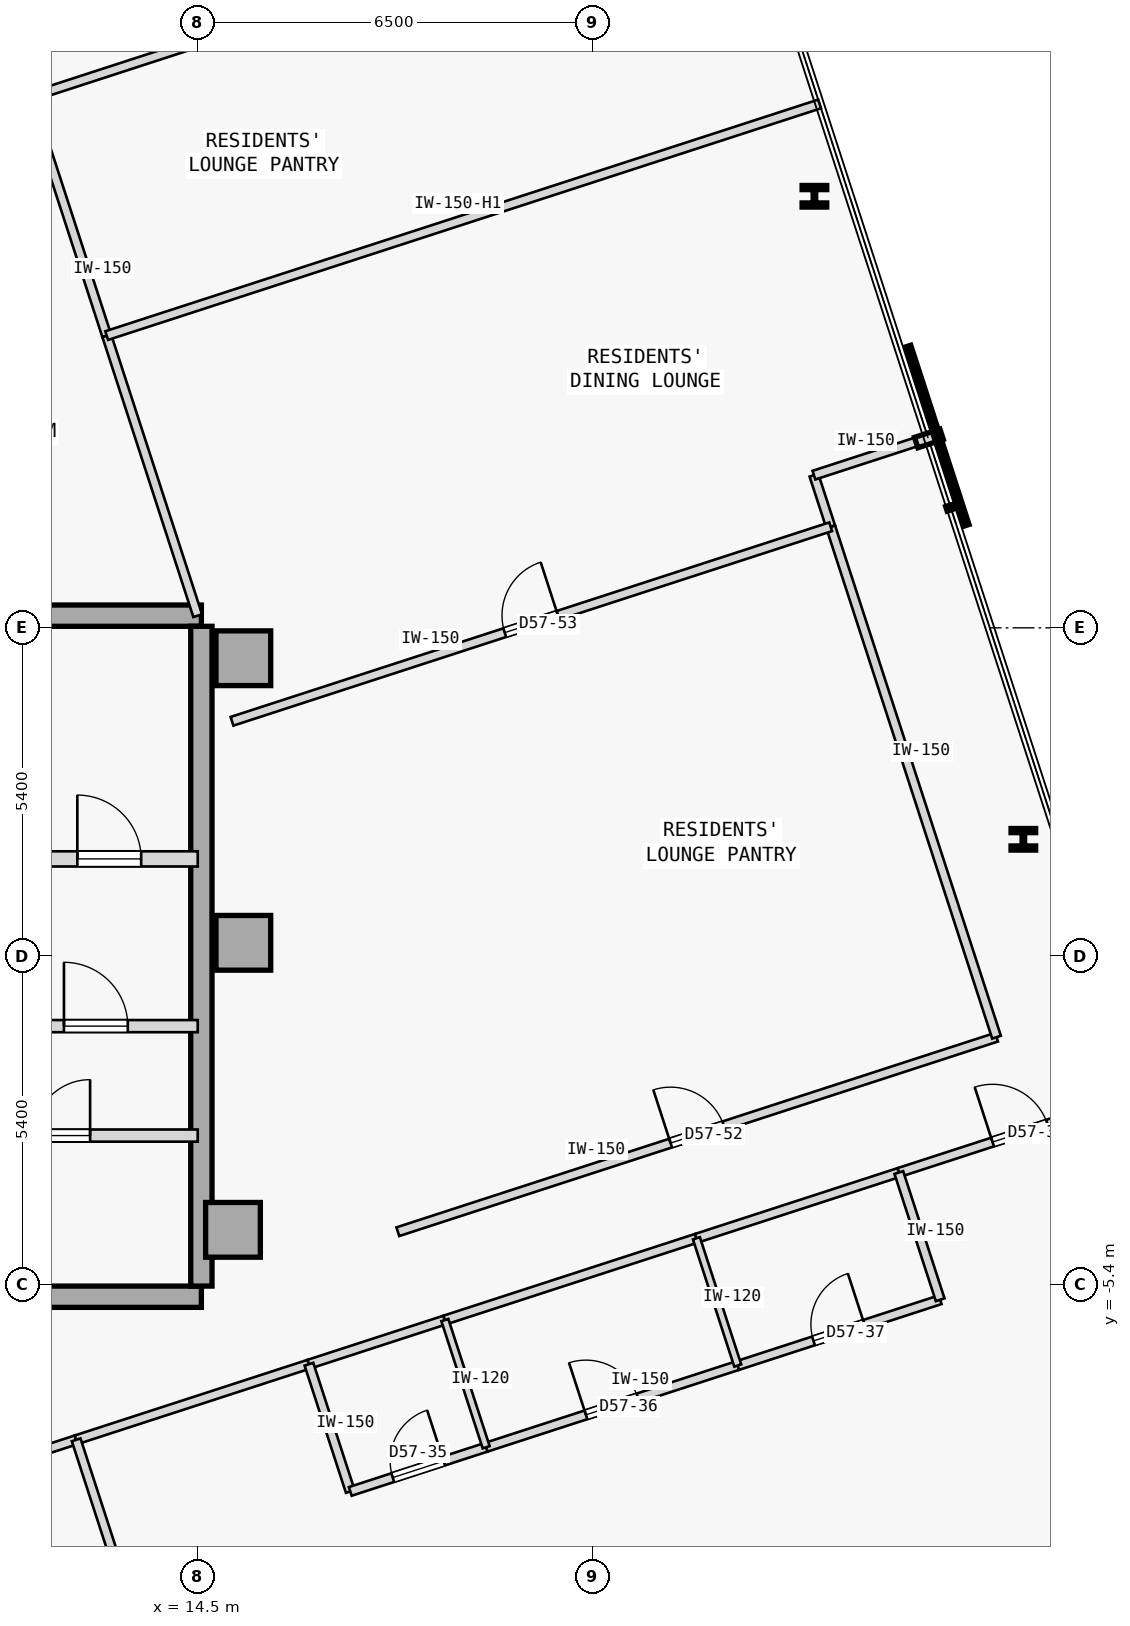
"""IFC4 building model, lengths in metres.
Left out: names, types, materials, properties, quantities, classifications, styles, units other than length and angle.
Written with IfcOpenShell. Run it as: python <this file> out.ifc"""

import sys

from ifc_helpers import new_model, si_unit, direction, frame, frame_2d, origin, origin_2d, place, context, subcontext, project, spatial, rectangle, i_section, extrude, element, fill, save


model = new_model("IFC4")
c1 = context("Model", 3, precision=1e-05, world=origin(), true_north=direction((0.0, 1.0)))
c2 = subcontext(c1, "Body", "Model", "MODEL_VIEW")
j1 = project(units=[si_unit("LENGTHUNIT", "METRE"), si_unit("PLANEANGLEUNIT", "RADIAN")], contexts=[c1])
p1 = place(None, origin())
s1 = spatial("IfcSite", under=j1, at=p1, CompositionType="ELEMENT")
p2 = place(p1, origin())
s2 = spatial("IfcBuilding", under=s1, at=p2, CompositionType="ELEMENT")
p3 = place(p2, frame((0.0, 0.0, 217.6)))
s3 = spatial("IfcBuildingStorey", under=s2, at=p3, CompositionType="ELEMENT", Elevation=217.6)
for number, where, z_axis, x_axis in (
    (1, (15.25, 4.9, 0.0), (0.0, 0.0, 1.0), (1.0, 0.0, 0.0)),
    (2, (15.25, 0.22, 0.0), (0.0, 0.0, 1.0), (1.0, 0.0, 0.0)),
    (3, (15.08, -4.5, 0.0), (0.0, 0.0, 1.0), (1.0, 0.0, 0.0)),
):
    element("IfcColumn", number, at=place(p3, frame(where, z_axis=z_axis, x_axis=x_axis)), inside=s3, PredefinedType="COLUMN", context=c2, shape_type="SweptSolid", body=[
        extrude(rectangle(XDim=0.9, YDim=0.9, at=origin_2d()), origin(), (0.0, 0.0, 1.0), 3.35),
    ])
p4 = place(p3, frame((3.15, 5.6, 0.0), z_axis=(0.0, 0.0, 1.0), x_axis=(1.0, 0.0, 0.0)))
e4 = element("IfcWall", 4, at=p4, inside=s3, PredefinedType="SHEAR", context=c2, shape_type="SweptSolid", body=[
    extrude(rectangle(XDim=11.41, YDim=0.35, at=frame_2d((5.705, 0.0))), origin(), (0.0, 0.0, 1.0), 3.125),
])
p5 = place(p3, frame((3.7, -5.6, 0.0), z_axis=(0.0, 0.0, 1.0), x_axis=(1.0, 0.0, 0.0)))
e5 = element("IfcWall", 5, at=p5, inside=s3, PredefinedType="SHEAR", context=c2, shape_type="SweptSolid", body=[
    extrude(rectangle(XDim=10.86, YDim=0.35, at=frame_2d((5.43, 0.0))), origin(), (0.0, 0.0, 1.0), 3.125),
])
p6 = place(p3, frame((14.56, -5.425, 0.0), z_axis=(0.0, 0.0, 1.0), x_axis=(0.0, 1.0, 0.0)))
e6 = element("IfcWall", 6, at=p6, inside=s3, PredefinedType="SHEAR", context=c2, shape_type="SweptSolid", body=[
    extrude(rectangle(XDim=10.85, YDim=0.35, at=frame_2d((5.425, 0.0))), origin(), (0.0, 0.0, 1.0), 3.125),
])
for number, where, z_axis, x_axis in (
    (7, (28.078, 1.922, 0.0), (0.0, 0.0, 1.0), (1.0, 0.0, 0.0)),
    (8, (24.642, 12.497, 0.0), (0.0, 0.0, 1.0), (1.0, 0.0, 0.0)),
):
    element("IfcColumn", number, at=place(p3, frame(where, z_axis=z_axis, x_axis=x_axis)), inside=s3, PredefinedType="COLUMN", context=c2, shape_type="SweptSolid", body=[
        extrude(i_section(OverallWidth=0.405, OverallDepth=0.355, WebThickness=0.042, FlangeThickness=0.068, FilletRadius=0.015, at=origin_2d()), origin(), (0.0, 0.0, 1.0), 3.35),
    ])
p7 = place(p3, frame((10.9, 1.6, 0.0), z_axis=(0.0, 0.0, 1.0), x_axis=(1.0, 0.0, 0.0)))
e9 = element("IfcWall", 9, at=p7, inside=s3, PredefinedType="STANDARD", context=c2, shape_type="SweptSolid", body=[
    extrude(rectangle(XDim=3.6, YDim=0.25, at=frame_2d((1.8, 0.0))), origin(), (0.0, 0.0, 1.0), 3.125),
])
p8 = place(p7, frame((1.62, 0.0, 0.0)))
e10 = element("IfcOpeningElement", 10, at=p8, cuts=e9, PredefinedType="OPENING", context=c2, shape_type="SweptSolid", body=[
    extrude(rectangle(XDim=1.05, YDim=2.15, at=frame_2d((0.525, 1.075))), frame((0.0, 0.135, 0.0), z_axis=(0.0, -1.0, 0.0), x_axis=(1.0, 0.0, 0.0)), (0.0, 0.0, 1.0), 0.27),
])
p9 = place(p3, frame((11.55, -1.15, 0.0), z_axis=(0.0, 0.0, 1.0), x_axis=(1.0, 0.0, 0.0)))
e11 = element("IfcWall", 11, at=p9, inside=s3, PredefinedType="STANDARD", context=c2, shape_type="SweptSolid", body=[
    extrude(rectangle(XDim=2.95, YDim=0.2, at=frame_2d((1.475, 0.0))), origin(), (0.0, 0.0, 1.0), 3.125),
])
p10 = place(p9, frame((0.75, 0.0, 0.0)))
e12 = element("IfcOpeningElement", 12, at=p10, cuts=e11, PredefinedType="OPENING", context=c2, shape_type="SweptSolid", body=[
    extrude(rectangle(XDim=1.05, YDim=2.18, at=frame_2d((0.525, 1.09))), frame((0.0, 0.11, 0.0), z_axis=(0.0, -1.0, 0.0), x_axis=(1.0, 0.0, 0.0)), (0.0, 0.0, 1.0), 0.22),
])
p11 = place(p3, frame((3.7, -2.95, 0.0), z_axis=(0.0, 0.0, 1.0), x_axis=(1.0, 0.0, 0.0)))
e13 = element("IfcWall", 13, at=p11, inside=s3, PredefinedType="STANDARD", context=c2, shape_type="SweptSolid", body=[
    extrude(rectangle(XDim=10.8, YDim=0.2, at=frame_2d((5.4, 0.0))), origin(), (0.0, 0.0, 1.0), 3.125),
])
p12 = place(p11, frame((0.53, 0.0, 0.0)))
e14 = element("IfcOpeningElement", 14, at=p12, cuts=e13, PredefinedType="OPENING", context=c2, shape_type="SweptSolid", body=[
    extrude(rectangle(XDim=1.1, YDim=2.15, at=frame_2d((0.55, 1.075))), frame((0.0, 0.11, 0.0), z_axis=(0.0, -1.0, 0.0), x_axis=(1.0, 0.0, 0.0)), (0.0, 0.0, 1.0), 0.22),
])
p13 = place(p11, frame((3.79, 0.0, 0.0)))
e15 = element("IfcOpeningElement", 15, at=p13, cuts=e13, PredefinedType="OPENING", context=c2, shape_type="SweptSolid", body=[
    extrude(rectangle(XDim=0.92, YDim=2.15, at=frame_2d((0.46, 1.075))), frame((0.0, 0.11, 0.0), z_axis=(0.0, -1.0, 0.0), x_axis=(1.0, 0.0, 0.0)), (0.0, 0.0, 1.0), 0.22),
])
p14 = place(p11, frame((8.11, 0.0, 0.0)))
e16 = element("IfcOpeningElement", 16, at=p14, cuts=e13, PredefinedType="OPENING", context=c2, shape_type="SweptSolid", body=[
    extrude(rectangle(XDim=0.92, YDim=2.15, at=frame_2d((0.46, 1.075))), frame((0.0, 0.11, 0.0), z_axis=(0.0, -1.0, 0.0), x_axis=(1.0, 0.0, 0.0)), (0.0, 0.0, 1.0), 0.22),
])
p15 = place(p3, frame((6.926, -9.765, 0.0), z_axis=(0.0, 0.0, 1.0), x_axis=(0.951054878391, 0.30902203528, 0.0)))
e17 = element("IfcWall", 17, at=p15, inside=s3, PredefinedType="PARTITIONING", context=c2, shape_type="SweptSolid", body=[
    extrude(rectangle(XDim=5.862, YDim=0.15, at=frame_2d((2.931, 0.0))), origin(), (0.0, 0.0, 1.0), 3.125),
])
p16 = place(p15, frame((2.456, 0.0, 0.0)))
e18 = element("IfcOpeningElement", 18, at=p16, cuts=e17, PredefinedType="OPENING", context=c2, shape_type="SweptSolid", body=[
    extrude(rectangle(XDim=0.95, YDim=2.15, at=frame_2d((0.475, 1.075))), frame((0.0, 0.085, 0.0), z_axis=(0.0, -1.0, 0.0), x_axis=(1.0, 0.0, 0.0)), (0.0, 0.0, 1.0), 0.17),
])
p17 = place(p3, frame((12.501, -7.953, 0.0), z_axis=(0.0, 0.0, 1.0), x_axis=(0.951046103464, 0.309049039936, 0.0)))
e19 = element("IfcWall", 19, at=p17, inside=s3, PredefinedType="PARTITIONING", context=c2, shape_type="SweptSolid", body=[
    extrude(rectangle(XDim=4.025, YDim=0.15, at=frame_2d((2.012, 0.0))), origin(), (0.0, 0.0, 1.0), 3.125),
])
p18 = place(p3, frame((26.03, -3.557, 0.0), z_axis=(0.0, 0.0, 1.0), x_axis=(0.951050334989, 0.309036017832, 0.0)))
e20 = element("IfcWall", 20, at=p18, inside=s3, PredefinedType="PARTITIONING", context=c2, shape_type="SweptSolid", body=[
    extrude(rectangle(XDim=4.191, YDim=0.15, at=frame_2d((2.095, 0.0))), origin(), (0.0, 0.0, 1.0), 3.125),
])
p19 = place(p18, frame((1.621, 0.0, 0.0)))
e21 = element("IfcOpeningElement", 21, at=p19, cuts=e20, PredefinedType="OPENING", context=c2, shape_type="SweptSolid", body=[
    extrude(rectangle(XDim=0.95, YDim=2.15, at=frame_2d((0.475, 1.075))), frame((0.0, 0.085, 0.0), z_axis=(0.0, -1.0, 0.0), x_axis=(1.0, 0.0, 0.0)), (0.0, 0.0, 1.0), 0.17),
])
p20 = place(p3, frame((16.329, -6.709, 0.0), z_axis=(0.0, 0.0, 1.0), x_axis=(0.951076048914, 0.308956872689, 0.0)))
e22 = element("IfcWall", 22, at=p20, inside=s3, PredefinedType="PARTITIONING", context=c2, shape_type="SweptSolid", body=[
    extrude(rectangle(XDim=2.35, YDim=0.15, at=frame_2d((1.175, 0.0))), origin(), (0.0, 0.0, 1.0), 3.125),
])
p21 = place(p3, frame((18.564, -5.983, 0.0), z_axis=(0.0, 0.0, 1.0), x_axis=(0.951052627573, 0.309028962374, 0.0)))
e23 = element("IfcWall", 23, at=p21, inside=s3, PredefinedType="PARTITIONING", context=c2, shape_type="SweptSolid", body=[
    extrude(rectangle(XDim=4.35, YDim=0.15, at=frame_2d((2.175, 0.0))), origin(), (0.0, 0.0, 1.0), 3.125),
])
p22 = place(p3, frame((22.701, -4.639, 0.0), z_axis=(0.0, 0.0, 1.0), x_axis=(0.951062257173, 0.308999325213, 0.0)))
e24 = element("IfcWall", 24, at=p22, inside=s3, PredefinedType="PARTITIONING", context=c2, shape_type="SweptSolid", body=[
    extrude(rectangle(XDim=3.5, YDim=0.15, at=frame_2d((1.75, 0.0))), origin(), (0.0, 0.0, 1.0), 3.125),
])
p23 = place(p3, frame((17.791, -4.531, 0.0), z_axis=(0.0, 0.0, 1.0), x_axis=(0.951056769902, 0.309016213852, 0.0)))
e25 = element("IfcWall", 25, at=p23, inside=s3, PredefinedType="PARTITIONING", context=c2, shape_type="SweptSolid", body=[
    extrude(rectangle(XDim=10.352, YDim=0.15, at=frame_2d((5.176, 0.0))), origin(), (0.0, 0.0, 1.0), 3.125),
])
p24 = place(p23, frame((4.716, 0.0, 0.0)))
e26 = element("IfcOpeningElement", 26, at=p24, cuts=e25, PredefinedType="OPENING", context=c2, shape_type="SweptSolid", body=[
    extrude(rectangle(XDim=0.92, YDim=2.15, at=frame_2d((0.46, 1.075))), frame((0.0, 0.085, 0.0), z_axis=(0.0, -1.0, 0.0), x_axis=(1.0, 0.0, 0.0)), (0.0, 0.0, 1.0), 0.17),
])
p25 = place(p3, frame((27.637, -1.332, 0.0), z_axis=(0.0, 0.0, 1.0), x_axis=(-0.309040411618, 0.951048907253, 0.0)))
e27 = element("IfcWall", 27, at=p25, inside=s3, PredefinedType="PARTITIONING", context=c2, shape_type="SweptSolid", body=[
    extrude(rectangle(XDim=8.826, YDim=0.15, at=frame_2d((4.413, 0.0))), origin(), (0.0, 0.0, 1.0), 3.125),
])
p26 = place(p3, frame((24.909, 7.062, 0.0), z_axis=(0.0, 0.0, 1.0), x_axis=(-0.30899324298, 0.951064233263, 0.0)))
e28 = element("IfcWall", 28, at=p26, inside=s3, PredefinedType="PARTITIONING", context=c2, shape_type="SweptSolid", body=[
    extrude(rectangle(XDim=0.892, YDim=0.15, at=frame_2d((0.446, 0.0))), origin(), (0.0, 0.0, 1.0), 3.125),
])
p27 = place(p3, frame((24.634, 7.91, 0.0), z_axis=(0.0, 0.0, 1.0), x_axis=(0.951054051148, 0.309024581215, 0.0)))
e29 = element("IfcWall", 29, at=p27, inside=s3, PredefinedType="PARTITIONING", context=c2, shape_type="SweptSolid", body=[
    extrude(rectangle(XDim=1.975, YDim=0.15, at=frame_2d((0.988, 0.0))), origin(), (0.0, 0.0, 1.0), 3.125),
])
p28 = place(p3, frame((11.73, 14.123, 0.0), z_axis=(0.0, 0.0, 1.0), x_axis=(0.951060263663, 0.309005460926, 0.0)))
e30 = element("IfcWall", 30, at=p28, inside=s3, PredefinedType="PARTITIONING", context=c2, shape_type="SweptSolid", body=[
    extrude(rectangle(XDim=12.327, YDim=0.15, at=frame_2d((6.164, 0.0))), origin(), (0.0, 0.0, 1.0), 3.125),
])
p29 = place(p28, frame((5.704, 0.0, 0.0)))
e31 = element("IfcOpeningElement", 31, at=p29, cuts=e30, PredefinedType="OPENING", context=c2, shape_type="SweptSolid", body=[
    extrude(rectangle(XDim=0.92, YDim=2.15, at=frame_2d((0.46, 1.075))), frame((0.0, 0.085, 0.0), z_axis=(0.0, -1.0, 0.0), x_axis=(1.0, 0.0, 0.0)), (0.0, 0.0, 1.0), 0.17),
])
p30 = place(p3, frame((15.548, -17.333, 0.0), z_axis=(0.0, 0.0, 1.0), x_axis=(-0.308999867152, 0.951062081097, 0.0)))
e32 = element("IfcWall", 32, at=p30, inside=s3, PredefinedType="PARTITIONING", context=c2, shape_type="SweptSolid", body=[
    extrude(rectangle(XDim=9.862, YDim=0.15, at=frame_2d((4.931, 0.0))), origin(), (0.0, 0.0, 1.0), 3.125),
])
p31 = place(p3, frame((17.009, -8.802, 0.0), z_axis=(0.0, 0.0, 1.0), x_axis=(-0.309028364152, 0.951052821956, 0.0)))
e33 = element("IfcWall", 33, at=p31, inside=s3, PredefinedType="PARTITIONING", context=c2, shape_type="SweptSolid", body=[
    extrude(rectangle(XDim=2.2, YDim=0.15, at=frame_2d((1.1, 0.0))), origin(), (0.0, 0.0, 1.0), 3.125),
])
p32 = place(p3, frame((17.009, -8.802, 0.0), z_axis=(0.0, 0.0, 1.0), x_axis=(0.951035595692, 0.309081373955, 0.0)))
e34 = element("IfcWall", 34, at=p32, inside=s3, PredefinedType="PARTITIONING", context=c2, shape_type="SweptSolid", body=[
    extrude(rectangle(XDim=2.35, YDim=0.15, at=frame_2d((1.175, 0.0))), origin(), (0.0, 0.0, 1.0), 3.125),
])
p33 = place(p32, frame((0.735, 0.0, 0.0)))
e35 = element("IfcOpeningElement", 35, at=p33, cuts=e34, PredefinedType="OPENING", context=c2, shape_type="SweptSolid", body=[
    extrude(rectangle(XDim=0.88, YDim=2.15, at=frame_2d((0.44, 1.075))), frame((0.0, 0.085, 0.0), z_axis=(0.0, -1.0, 0.0), x_axis=(1.0, 0.0, 0.0)), (0.0, 0.0, 1.0), 0.17),
])
p34 = place(p3, frame((19.244, -8.075, 0.0), z_axis=(0.0, 0.0, 1.0), x_axis=(0.951057987102, 0.309012467661, 0.0)))
e36 = element("IfcWall", 36, at=p34, inside=s3, PredefinedType="PARTITIONING", context=c2, shape_type="SweptSolid", body=[
    extrude(rectangle(XDim=4.35, YDim=0.15, at=frame_2d((2.175, 0.0))), origin(), (0.0, 0.0, 1.0), 3.125),
])
p35 = place(p34, frame((1.725, 0.0, 0.0)))
e37 = element("IfcOpeningElement", 37, at=p35, cuts=e36, PredefinedType="OPENING", context=c2, shape_type="SweptSolid", body=[
    extrude(rectangle(XDim=0.9, YDim=2.15, at=frame_2d((0.45, 1.075))), frame((0.0, 0.085, 0.0), z_axis=(0.0, -1.0, 0.0), x_axis=(1.0, 0.0, 0.0)), (0.0, 0.0, 1.0), 0.17),
])
p36 = place(p3, frame((23.381, -6.731, 0.0), z_axis=(0.0, 0.0, 1.0), x_axis=(0.951055596592, 0.309019824916, 0.0)))
e38 = element("IfcWall", 38, at=p36, inside=s3, PredefinedType="PARTITIONING", context=c2, shape_type="SweptSolid", body=[
    extrude(rectangle(XDim=3.5, YDim=0.15, at=frame_2d((1.75, 0.0))), origin(), (0.0, 0.0, 1.0), 3.125),
])
p37 = place(p36, frame((1.31, 0.0, 0.0)))
e39 = element("IfcOpeningElement", 39, at=p37, cuts=e38, PredefinedType="OPENING", context=c2, shape_type="SweptSolid", body=[
    extrude(rectangle(XDim=0.88, YDim=2.15, at=frame_2d((0.44, 1.075))), frame((0.0, 0.085, 0.0), z_axis=(0.0, -1.0, 0.0), x_axis=(1.0, 0.0, 0.0)), (0.0, 0.0, 1.0), 0.17),
])
p38 = place(p3, frame((26.709, -5.65, 0.0), z_axis=(0.0, 0.0, 1.0), x_axis=(-0.308960600764, 0.951074837842, 0.0)))
e40 = element("IfcWall", 40, at=p38, inside=s3, PredefinedType="PARTITIONING", context=c2, shape_type="SweptSolid", body=[
    extrude(rectangle(XDim=2.2, YDim=0.15, at=frame_2d((1.1, 0.0))), origin(), (0.0, 0.0, 1.0), 3.125),
])
for number, where, z_axis, x_axis in (
    (41, (19.244, -8.075, 0.0), (0.0, 0.0, 1.0), (-0.309, 0.951, 0.0)),
    (42, (23.381, -6.731, 0.0), (0.0, 0.0, 1.0), (-0.309, 0.951, 0.0)),
):
    element("IfcWall", number, at=place(p3, frame(where, z_axis=z_axis, x_axis=x_axis)), inside=s3, PredefinedType="PARTITIONING", context=c2, shape_type="SweptSolid", body=[
        extrude(rectangle(XDim=2.2, YDim=0.12, at=frame_2d((1.1, 0.0))), origin(), (0.0, 0.0, 1.0), 3.125),
    ])
p39 = place(p3, frame((14.5, 5.6, 0.0), z_axis=(0.0, 0.0, 1.0), x_axis=(-0.308974360462, 0.951070367837, 0.0)))
e43 = element("IfcWall", 43, at=p39, inside=s3, PredefinedType="PARTITIONING", context=c2, shape_type="SweptSolid", body=[
    extrude(rectangle(XDim=4.843, YDim=0.15, at=frame_2d((2.421, 0.0))), origin(), (0.0, 0.0, 1.0), 3.125),
])
p40 = place(p3, frame((13.003, 10.206, 0.0), z_axis=(0.0, 0.0, 1.0), x_axis=(-0.309035144366, 0.951050618814, 0.0)))
e44 = element("IfcWall", 44, at=p40, inside=s3, PredefinedType="PARTITIONING", context=c2, shape_type="SweptSolid", body=[
    extrude(rectangle(XDim=4.119, YDim=0.15, at=frame_2d((2.06, 0.0))), origin(), (0.0, 0.0, 1.0), 3.125),
])
p41 = place(p3, frame((15.064, 3.863, 0.0), z_axis=(0.0, 0.0, 1.0), x_axis=(0.951061448945, 0.309001812827, 0.0)))
e45 = element("IfcWall", 45, at=p41, inside=s3, PredefinedType="PARTITIONING", context=c2, shape_type="SweptSolid", body=[
    extrude(rectangle(XDim=10.352, YDim=0.15, at=frame_2d((5.176, 0.0))), origin(), (0.0, 0.0, 1.0), 3.125),
])
p42 = place(p41, frame((4.716, 0.0, 0.0)))
e46 = element("IfcOpeningElement", 46, at=p42, cuts=e45, PredefinedType="OPENING", context=c2, shape_type="SweptSolid", body=[
    extrude(rectangle(XDim=0.92, YDim=2.15, at=frame_2d((0.46, 1.075))), frame((0.0, 0.085, 0.0), z_axis=(0.0, -1.0, 0.0), x_axis=(1.0, 0.0, 0.0)), (0.0, 0.0, 1.0), 0.17),
])
p43 = place(p3, frame((13.003, 10.206, 0.0), z_axis=(0.0, 0.0, 1.0), x_axis=(0.951060263663, 0.309005460926, 0.0)))
e47 = element("IfcWall", 47, at=p43, inside=s3, PredefinedType="PARTITIONING", context=c2, shape_type="SweptSolid", body=[
    extrude(rectangle(XDim=12.327, YDim=0.15, at=frame_2d((6.164, 0.0))), origin(), (0.0, 0.0, 1.0), 2.675),
])
p44 = place(p8, origin())
e48 = element("IfcDoor", 48, at=p44, inside=s3, OperationType="SINGLE_SWING_LEFT", PredefinedType="DOOR", context=c2, shape_type="SweptSolid", body=[
    extrude(rectangle(XDim=1.05, YDim=2.15, at=frame_2d((0.525, 1.075))), frame((0.0, 0.025, 0.0), z_axis=(0.0, -1.0, 0.0), x_axis=(1.0, 0.0, 0.0)), (0.0, 0.0, 1.0), 0.05),
])
fill(e10, e48)
p45 = place(p10, origin())
e49 = element("IfcDoor", 49, at=p45, inside=s3, OperationType="SINGLE_SWING_LEFT", PredefinedType="DOOR", context=c2, shape_type="SweptSolid", body=[
    extrude(rectangle(XDim=1.05, YDim=2.18, at=frame_2d((0.525, 1.09))), frame((0.0, 0.025, 0.0), z_axis=(0.0, -1.0, 0.0), x_axis=(1.0, 0.0, 0.0)), (0.0, 0.0, 1.0), 0.05),
])
fill(e12, e49)
p46 = place(p14, origin())
e50 = element("IfcDoor", 50, at=p46, inside=s3, OperationType="SINGLE_SWING_RIGHT", PredefinedType="DOOR", context=c2, shape_type="SweptSolid", body=[
    extrude(rectangle(XDim=0.92, YDim=2.15, at=frame_2d((0.46, 1.075))), frame((0.0, 0.025, 0.0), z_axis=(0.0, -1.0, 0.0), x_axis=(1.0, 0.0, 0.0)), (0.0, 0.0, 1.0), 0.05),
])
fill(e16, e50)
p47 = place(p19, origin())
e51 = element("IfcDoor", 51, at=p47, inside=s3, OperationType="SINGLE_SWING_LEFT", PredefinedType="DOOR", context=c2, shape_type="SweptSolid", body=[
    extrude(rectangle(XDim=0.95, YDim=2.15, at=frame_2d((0.475, 1.075))), frame((0.0, 0.025, 0.0), z_axis=(0.0, -1.0, 0.0), x_axis=(1.0, 0.0, 0.0)), (0.0, 0.0, 1.0), 0.05),
])
fill(e21, e51)
p48 = place(p33, origin())
e52 = element("IfcDoor", 52, at=p48, inside=s3, OperationType="SINGLE_SWING_RIGHT", PredefinedType="DOOR", context=c2, shape_type="SweptSolid", body=[
    extrude(rectangle(XDim=0.88, YDim=2.15, at=frame_2d((0.44, 1.075))), frame((0.0, 0.025, 0.0), z_axis=(0.0, -1.0, 0.0), x_axis=(1.0, 0.0, 0.0)), (0.0, 0.0, 1.0), 0.05),
])
fill(e35, e52)
p49 = place(p35, origin())
e53 = element("IfcDoor", 53, at=p49, inside=s3, OperationType="SINGLE_SWING_LEFT", PredefinedType="DOOR", context=c2, shape_type="SweptSolid", body=[
    extrude(rectangle(XDim=0.9, YDim=2.15, at=frame_2d((0.45, 1.075))), frame((0.0, 0.025, 0.0), z_axis=(0.0, -1.0, 0.0), x_axis=(1.0, 0.0, 0.0)), (0.0, 0.0, 1.0), 0.05),
])
fill(e37, e53)
p50 = place(p37, origin())
e54 = element("IfcDoor", 54, at=p50, inside=s3, OperationType="SINGLE_SWING_RIGHT", PredefinedType="DOOR", context=c2, shape_type="SweptSolid", body=[
    extrude(rectangle(XDim=0.88, YDim=2.15, at=frame_2d((0.44, 1.075))), frame((0.0, 0.025, 0.0), z_axis=(0.0, -1.0, 0.0), x_axis=(1.0, 0.0, 0.0)), (0.0, 0.0, 1.0), 0.05),
])
fill(e39, e54)
p51 = place(p24, origin())
e55 = element("IfcDoor", 55, at=p51, inside=s3, OperationType="SINGLE_SWING_LEFT", PredefinedType="DOOR", context=c2, shape_type="SweptSolid", body=[
    extrude(rectangle(XDim=0.92, YDim=2.15, at=frame_2d((0.46, 1.075))), frame((0.0, 0.025, 0.0), z_axis=(0.0, -1.0, 0.0), x_axis=(1.0, 0.0, 0.0)), (0.0, 0.0, 1.0), 0.05),
])
fill(e26, e55)
p52 = place(p42, origin())
e56 = element("IfcDoor", 56, at=p52, inside=s3, OperationType="SINGLE_SWING_RIGHT", PredefinedType="DOOR", context=c2, shape_type="SweptSolid", body=[
    extrude(rectangle(XDim=0.92, YDim=2.15, at=frame_2d((0.46, 1.075))), frame((0.0, 0.025, 0.0), z_axis=(0.0, -1.0, 0.0), x_axis=(1.0, 0.0, 0.0)), (0.0, 0.0, 1.0), 0.05),
])
fill(e46, e56)
save(model, sys.argv[1])
